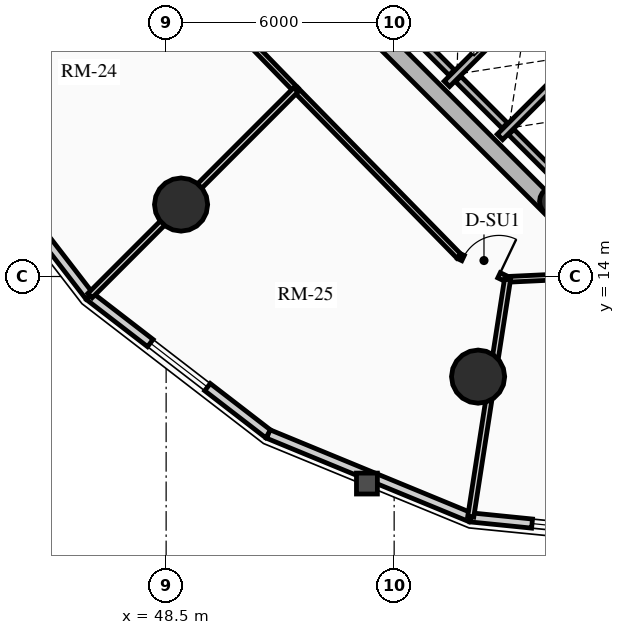
"""IFC4 building model, lengths in metres.
Left out: names, types, materials, properties, quantities, classifications, styles, units other than length and angle.
Written with IfcOpenShell. Run it as: python <this file> out.ifc"""

import sys

from ifc_helpers import new_model, si_unit, direction, frame, frame_2d, origin, origin_2d, place, context, subcontext, project, spatial, rectangle, circle, hollow_circle, extrude, source, transform, mapped, element, fill, save


model = new_model("IFC4")
c1 = context("Model", 3, precision=1e-05, world=origin(), true_north=direction((0.0, 1.0)))
c2 = subcontext(c1, "Body", "Model", "MODEL_VIEW")
j1 = project(units=[si_unit("LENGTHUNIT", "METRE"), si_unit("PLANEANGLEUNIT", "RADIAN")], contexts=[c1])
p1 = place(None, origin())
s1 = spatial("IfcSite", under=j1, at=p1, CompositionType="ELEMENT")
p2 = place(p1, origin())
s2 = spatial("IfcBuilding", under=s1, at=p2, CompositionType="ELEMENT")
p3 = place(p2, frame((0.0, 0.0, 122.53)))
s3 = spatial("IfcBuildingStorey", under=s2, at=p3, CompositionType="ELEMENT", Elevation=122.53)
p4 = place(p3, frame((58.737, 15.697, 0.0), z_axis=(0.0, 0.0, 1.0), x_axis=(-0.707106781187, 0.707106781187, 0.0)))
e1 = element("IfcWall", 1, at=p4, inside=s3, PredefinedType="SHEAR", context=c2, shape_type="SweptSolid", body=[
    extrude(rectangle(XDim=14.2, YDim=0.45, at=frame_2d((7.1, 0.0))), origin(), (0.0, 0.0, 1.0), 2.91),
])
p5 = place(p3, frame((58.578, 15.856, 0.0), z_axis=(0.0, 0.0, 1.0), x_axis=(0.707106781187, 0.707106781187, 0.0)))
e2 = element("IfcWall", 2, at=p5, inside=s3, PredefinedType="SHEAR", context=c2, shape_type="SweptSolid", body=[
    extrude(rectangle(XDim=10.7, YDim=0.45, at=frame_2d((5.35, 0.0))), origin(), (0.0, 0.0, 1.0), 2.91),
])
m1 = source(origin(), c2, "Body", "SweptSolid", [
    extrude(rectangle(XDim=1.5, YDim=2.02, at=frame_2d((0.75, 1.01))), frame((0.0, 0.235, 0.0), z_axis=(0.0, -1.0, 0.0), x_axis=(1.0, 0.0, 0.0)), (0.0, 0.0, 1.0), 0.47),
])
p6 = place(p5, frame((5.45, 0.0, 0.0)))
e3 = element("IfcOpeningElement", 3, at=p6, cuts=e2, PredefinedType="OPENING", context=c2, shape_type="MappedRepresentation", body=[
    mapped(m1, transform((0.0, 0.0, 0.0), x_axis=(1.0, 0.0, 0.0), y_axis=(0.0, 1.0, 0.0), z_axis=(0.0, 0.0, 1.0), scale=1.0)),
])
p7 = place(p3, frame((61.078, 18.355, 0.0), z_axis=(0.0, 0.0, 1.0), x_axis=(-0.707106781187, 0.707106781187, 0.0)))
e4 = element("IfcWall", 4, at=p7, inside=s3, PredefinedType="SHEAR", context=c2, shape_type="SweptSolid", body=[
    extrude(rectangle(XDim=13.75, YDim=0.35, at=frame_2d((6.875, 0.0))), origin(), (0.0, 0.0, 1.0), 2.91),
])
m2 = source(origin(), c2, "Body", "SweptSolid", [
    extrude(rectangle(XDim=1.1, YDim=2.015, at=frame_2d((0.55, 1.007))), frame((0.0, 0.185, 0.0), z_axis=(0.0, -1.0, 0.0), x_axis=(1.0, 0.0, 0.0)), (0.0, 0.0, 1.0), 0.37),
])
p8 = place(p7, frame((4.875, 0.0, 0.0)))
e5 = element("IfcOpeningElement", 5, at=p8, cuts=e4, PredefinedType="OPENING", context=c2, shape_type="MappedRepresentation", body=[
    mapped(m2, transform((0.0, 0.0, 0.0), x_axis=(1.0, 0.0, 0.0), y_axis=(0.0, 1.0, 0.0), z_axis=(0.0, 0.0, 1.0), scale=1.0)),
])
m3 = source(origin(), c2, "Body", "SweptSolid", [
    extrude(rectangle(XDim=1.15, YDim=2.02, at=frame_2d((0.575, 1.01))), frame((0.0, 0.185, 0.0), z_axis=(0.0, -1.0, 0.0), x_axis=(1.0, 0.0, 0.0)), (0.0, 0.0, 1.0), 0.37),
])
p9 = place(p7, frame((7.295, 0.0, 0.0)))
e6 = element("IfcOpeningElement", 6, at=p9, cuts=e4, PredefinedType="OPENING", context=c2, shape_type="MappedRepresentation", body=[
    mapped(m3, transform((0.0, 0.0, 0.0), x_axis=(1.0, 0.0, 0.0), y_axis=(0.0, 1.0, 0.0), z_axis=(0.0, 0.0, 1.0), scale=1.0)),
])
p10 = place(p3, frame((58.706, 15.976, 0.0), z_axis=(0.0, 0.0, 1.0), x_axis=(0.707106781187, 0.707106781187, 0.0)))
e7 = element("IfcColumn", 7, at=p10, inside=s3, PredefinedType="COLUMN", context=c2, shape_type="SweptSolid", body=[
    extrude(hollow_circle(Radius=0.38, WallThickness=0.032, at=origin_2d()), origin(), (0.0, 0.0, 1.0), 2.91),
])
for number, where, z_axis, x_axis in (
    (8, (48.893, 15.893, 0.0), (0.0, 0.0, 1.0), (1.0, 0.0, 0.0)),
    (9, (56.709, 11.365, 0.0), (0.0, 0.0, 1.0), (1.0, 0.0, 0.0)),
):
    element("IfcColumn", number, at=place(p3, frame(where, z_axis=z_axis, x_axis=x_axis)), inside=s3, PredefinedType="USERDEFINED", context=c2, shape_type="SweptSolid", body=[
        extrude(circle(Radius=0.7, at=origin_2d()), origin(), (0.0, 0.0, 1.0), 2.91),
    ])
p11 = place(p3, frame((46.483, 13.483, 0.0), z_axis=(0.0, 0.0, 1.0), x_axis=(-0.61054437102, 0.791982052206, 0.0)))
e10 = element("IfcWall", 10, at=p11, inside=s3, PredefinedType="SOLIDWALL", context=c2, shape_type="SweptSolid", body=[
    extrude(rectangle(XDim=5.942, YDim=0.24, at=frame_2d((2.971, 0.0))), origin(), (0.0, 0.0, 1.0), 2.139),
])
p12 = place(p3, frame((51.189, 9.855, 0.0), z_axis=(0.0, 0.0, 1.0), x_axis=(-0.791982052206, 0.61054437102, 0.0)))
e11 = element("IfcWall", 11, at=p12, inside=s3, PredefinedType="SOLIDWALL", context=c2, shape_type="SweptSolid", body=[
    extrude(rectangle(XDim=5.942, YDim=0.24, at=frame_2d((2.971, 0.0))), origin(), (0.0, 0.0, 1.0), 2.139),
])
m4 = source(origin(), c2, "Body", "SweptSolid", [
    extrude(rectangle(XDim=1.9, YDim=1.35, at=frame_2d((0.95, 0.675))), frame((0.0, 0.13, 0.0), z_axis=(0.0, -1.0, 0.0), x_axis=(1.0, 0.0, 0.0)), (0.0, 0.0, 1.0), 0.26),
])
p13 = place(p12, frame((2.021, 0.0, 0.65)))
e12 = element("IfcOpeningElement", 12, at=p13, cuts=e11, PredefinedType="OPENING", context=c2, shape_type="MappedRepresentation", body=[
    mapped(m4, transform((0.0, 0.0, 0.0), x_axis=(1.0, 0.0, 0.0), y_axis=(0.0, 1.0, 0.0), z_axis=(0.0, 0.0, 1.0), scale=1.0)),
])
p14 = place(p3, frame((56.513, 7.661, 0.0), z_axis=(0.0, 0.0, 1.0), x_axis=(-0.924563909604, 0.381027003055, 0.0)))
e13 = element("IfcWall", 13, at=p14, inside=s3, PredefinedType="SOLIDWALL", context=c2, shape_type="SweptSolid", body=[
    extrude(rectangle(XDim=5.758, YDim=0.24, at=frame_2d((2.879, 0.0))), origin(), (0.0, 0.0, 1.0), 2.139),
])
p15 = place(p3, frame((61.933, 7.115, 0.0), z_axis=(0.0, 0.0, 1.0), x_axis=(-0.994971754311, 0.10015591906, 0.0)))
e14 = element("IfcWall", 14, at=p15, inside=s3, PredefinedType="SOLIDWALL", context=c2, shape_type="SweptSolid", body=[
    extrude(rectangle(XDim=5.448, YDim=0.24, at=frame_2d((2.724, 0.0))), origin(), (0.0, 0.0, 1.0), 2.139),
])
m5 = source(origin(), c2, "Body", "SweptSolid", [
    extrude(rectangle(XDim=2.2, YDim=1.35, at=frame_2d((1.1, 0.675))), frame((0.0, 0.13, 0.0), z_axis=(0.0, -1.0, 0.0), x_axis=(1.0, 0.0, 0.0)), (0.0, 0.0, 1.0), 0.26),
])
p16 = place(p15, frame((1.624, 0.0, 0.65)))
e15 = element("IfcOpeningElement", 15, at=p16, cuts=e14, PredefinedType="OPENING", context=c2, shape_type="MappedRepresentation", body=[
    mapped(m5, transform((0.0, 0.0, 0.0), x_axis=(1.0, 0.0, 0.0), y_axis=(0.0, 1.0, 0.0), z_axis=(0.0, 0.0, 1.0), scale=1.0)),
])
p17 = place(p3, frame((55.888, 19.069, 0.0), z_axis=(0.0, 0.0, 1.0), x_axis=(0.707106781187, 0.707106781187, 0.0)))
e16 = element("IfcWall", 16, at=p17, inside=s3, PredefinedType="SHEAR", context=c2, shape_type="SweptSolid", body=[
    extrude(rectangle(XDim=2.97, YDim=0.2, at=frame_2d((1.485, 0.0))), origin(), (0.0, 0.0, 1.0), 2.91),
])
p18 = place(p3, frame((56.015, 19.366, 0.0), z_axis=(0.0, 0.0, 1.0), x_axis=(-0.707106781187, 0.707106781187, 0.0)))
e17 = element("IfcWall", 17, at=p18, inside=s3, PredefinedType="SHEAR", context=c2, shape_type="SweptSolid", body=[
    extrude(rectangle(XDim=2.44, YDim=0.2, at=frame_2d((1.22, 0.0))), origin(), (0.0, 0.0, 1.0), 2.91),
])
p19 = place(p3, frame((57.284, 17.673, 0.0), z_axis=(0.0, 0.0, 1.0), x_axis=(0.707147878904, 0.70706568108, 0.0)))
e18 = element("IfcWall", 18, at=p19, inside=s3, PredefinedType="SHEAR", context=c2, shape_type="SweptSolid", body=[
    extrude(rectangle(XDim=2.97, YDim=0.2, at=frame_2d((1.485, 0.0))), origin(), (0.0, 0.0, 1.0), 2.91),
])
p20 = place(p3, frame((57.412, 17.97, 0.0), z_axis=(0.0, 0.0, 1.0), x_axis=(-0.707106781187, 0.707106781187, 0.0)))
e19 = element("IfcWall", 19, at=p20, inside=s3, PredefinedType="SHEAR", context=c2, shape_type="SweptSolid", body=[
    extrude(rectangle(XDim=1.735, YDim=0.2, at=frame_2d((0.867, 0.0))), origin(), (0.0, 0.0, 1.0), 2.91),
])
p21 = place(p3, frame((58.737, 16.644, 0.0), z_axis=(0.0, 0.0, 1.0), x_axis=(-0.707032117043, 0.707181437447, 0.0)))
e20 = element("IfcWall", 20, at=p21, inside=s3, PredefinedType="SHEAR", context=c2, shape_type="SweptSolid", body=[
    extrude(rectangle(XDim=1.635, YDim=0.2, at=frame_2d((0.817, 0.0))), origin(), (0.0, 0.0, 1.0), 2.91),
])
p22 = place(p3, frame((47.729, 23.23, 0.0), z_axis=(0.0, 0.0, 1.0), x_axis=(0.696119834292, -0.717925606386, 0.0)))
e21 = element("IfcWall", 21, at=p22, inside=s3, PredefinedType="PARTITIONING", context=c2, shape_type="SweptSolid", body=[
    extrude(rectangle(XDim=6.012, YDim=0.15, at=frame_2d((3.006, 0.0))), origin(), (0.0, 0.0, 1.0), 2.615),
])
p23 = place(p3, frame((51.914, 18.914, 0.0), z_axis=(0.0, 0.0, 1.0), x_axis=(0.6999614951, -0.71418058317, 0.0)))
e22 = element("IfcWall", 22, at=p23, inside=s3, PredefinedType="PARTITIONING", context=c2, shape_type="SweptSolid", body=[
    extrude(rectangle(XDim=6.13, YDim=0.15, at=frame_2d((3.065, 0.0))), origin(), (0.0, 0.0, 1.0), 2.185),
])
p24 = place(p3, frame((56.204, 14.536, 0.0), z_axis=(0.0, 0.0, 1.0), x_axis=(0.902244982981, -0.431223828986, 0.0)))
e23 = element("IfcWall", 23, at=p24, inside=s3, PredefinedType="PARTITIONING", context=c2, shape_type="SweptSolid", body=[
    extrude(rectangle(XDim=1.417, YDim=0.15, at=frame_2d((0.708, 0.0))), origin(), (0.0, 0.0, 1.0), 2.185),
])
m6 = source(origin(), c2, "Body", "SweptSolid", [
    extrude(rectangle(XDim=1.05, YDim=2.015, at=frame_2d((0.525, 1.007))), frame((0.0, 0.085, 0.0), z_axis=(0.0, -1.0, 0.0), x_axis=(1.0, 0.0, 0.0)), (0.0, 0.0, 1.0), 0.17),
])
p25 = place(p24, frame((0.12, 0.0, 0.0)))
e24 = element("IfcOpeningElement", 24, at=p25, cuts=e23, PredefinedType="OPENING", context=c2, shape_type="MappedRepresentation", body=[
    mapped(m6, transform((0.0, 0.0, 0.0), x_axis=(1.0, 0.0, 0.0), y_axis=(0.0, 1.0, 0.0), z_axis=(0.0, 0.0, 1.0), scale=1.0)),
])
p26 = place(p3, frame((57.483, 13.925, 0.0), z_axis=(0.0, 0.0, 1.0), x_axis=(0.998884345706, 0.047223552414, 0.0)))
e25 = element("IfcWall", 25, at=p26, inside=s3, PredefinedType="PARTITIONING", context=c2, shape_type="SweptSolid", body=[
    extrude(rectangle(XDim=1.494, YDim=0.15, at=frame_2d((0.747, 0.0))), origin(), (0.0, 0.0, 1.0), 2.185),
])
p27 = place(p3, frame((51.914, 18.914, 0.0), z_axis=(0.0, 0.0, 1.0), x_axis=(-0.707106781187, -0.707106781187, 0.0)))
e26 = element("IfcWall", 26, at=p27, inside=s3, PredefinedType="PARTITIONING", context=c2, shape_type="SweptSolid", body=[
    extrude(rectangle(XDim=7.661, YDim=0.16, at=frame_2d((3.831, 0.0))), origin(), (0.0, 0.0, 1.0), 2.139),
])
p28 = place(p3, frame((57.483, 13.925, 0.0), z_axis=(0.0, 0.0, 1.0), x_axis=(-0.153035505395, -0.988220690984, 0.0)))
e27 = element("IfcWall", 27, at=p28, inside=s3, PredefinedType="PARTITIONING", context=c2, shape_type="SweptSolid", body=[
    extrude(rectangle(XDim=6.319, YDim=0.16, at=frame_2d((3.16, 0.0))), origin(), (0.0, 0.0, 1.0), 2.139),
])
m7 = source(origin(), c2, "Body", "SweptSolid", [
    extrude(rectangle(XDim=1.9, YDim=1.35, at=frame_2d((0.95, 0.675))), frame((0.0, 0.03, 0.0), z_axis=(0.0, -1.0, 0.0), x_axis=(1.0, 0.0, 0.0)), (0.0, 0.0, 1.0), 0.06),
])
p29 = place(p13, origin())
e28 = element("IfcWindow", 28, at=p29, inside=s3, PartitioningType="DOUBLE_PANEL_VERTICAL", PredefinedType="WINDOW", context=c2, shape_type="MappedRepresentation", body=[
    mapped(m7, transform((0.0, 0.0, 0.0), x_axis=(1.0, 0.0, 0.0), y_axis=(0.0, 1.0, 0.0), z_axis=(0.0, 0.0, 1.0), scale=1.0)),
])
fill(e12, e28)
m8 = source(origin(), c2, "Body", "SweptSolid", [
    extrude(rectangle(XDim=2.2, YDim=1.35, at=frame_2d((1.1, 0.675))), frame((0.0, 0.03, 0.0), z_axis=(0.0, -1.0, 0.0), x_axis=(1.0, 0.0, 0.0)), (0.0, 0.0, 1.0), 0.06),
])
p30 = place(p16, origin())
e29 = element("IfcWindow", 29, at=p30, inside=s3, PartitioningType="DOUBLE_PANEL_VERTICAL", PredefinedType="WINDOW", context=c2, shape_type="MappedRepresentation", body=[
    mapped(m8, transform((0.0, 0.0, 0.0), x_axis=(1.0, 0.0, 0.0), y_axis=(0.0, 1.0, 0.0), z_axis=(0.0, 0.0, 1.0), scale=1.0)),
])
fill(e15, e29)
m9 = source(origin(), c2, "Body", "SweptSolid", [
    extrude(rectangle(XDim=1.05, YDim=2.015, at=frame_2d((0.525, 1.007))), frame((0.0, 0.025, 0.0), z_axis=(0.0, -1.0, 0.0), x_axis=(1.0, 0.0, 0.0)), (0.0, 0.0, 1.0), 0.05),
])
p31 = place(p25, origin())
e30 = element("IfcDoor", 30, at=p31, inside=s3, OperationType="SINGLE_SWING_RIGHT", PredefinedType="DOOR", context=c2, shape_type="MappedRepresentation", body=[
    mapped(m9, transform((0.0, 0.0, 0.0), x_axis=(1.0, 0.0, 0.0), y_axis=(0.0, 1.0, 0.0), z_axis=(0.0, 0.0, 1.0), scale=1.0)),
])
fill(e24, e30)
save(model, sys.argv[1])
